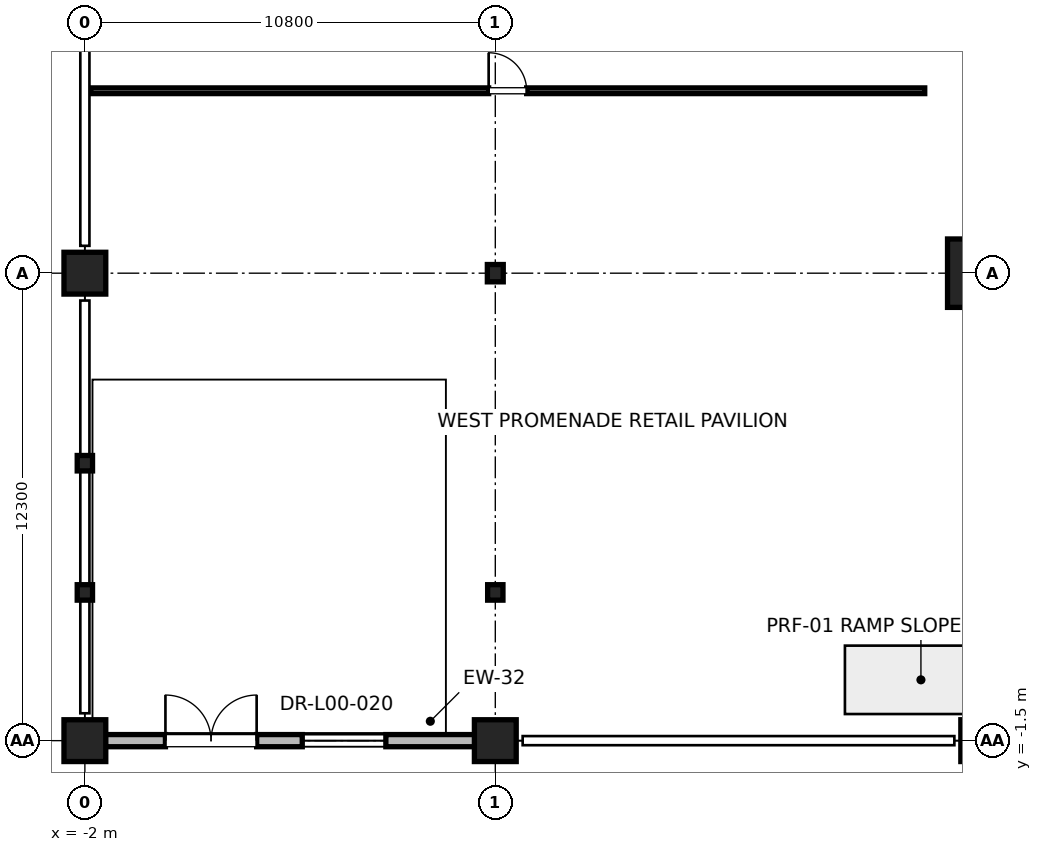
"""IFC4 building model, lengths in metres.
Left out: names, types, materials, properties, quantities, classifications, styles, units other than length and angle.
Written with IfcOpenShell. Run it as: python <this file> out.ifc"""

import sys

from ifc_helpers import new_model, si_unit, direction, frame, frame_2d, origin, origin_2d, place, context, subcontext, project, spatial, rectangle, i_section, extrude, element, fill, save


model = new_model("IFC4")
c1 = context("Model", 3, precision=1e-05, world=origin(), true_north=direction((0.0, 1.0)))
c2 = subcontext(c1, "Body", "Model", "MODEL_VIEW")
j1 = project(units=[si_unit("LENGTHUNIT", "METRE"), si_unit("PLANEANGLEUNIT", "RADIAN")], contexts=[c1])
p1 = place(None, origin())
s1 = spatial("IfcSite", under=j1, at=p1, CompositionType="ELEMENT")
p2 = place(p1, origin())
s2 = spatial("IfcBuilding", under=s1, at=p2, CompositionType="ELEMENT")
p3 = place(p2, origin())
s3 = spatial("IfcBuildingStorey", under=s2, at=p3, CompositionType="ELEMENT", Elevation=0.0)
p4 = place(p3, frame((21.6, 10.8, 0.0), z_axis=(0.0, 0.0, 1.0), x_axis=(1.0, 0.0, 0.0)))
e1 = element("IfcColumn", 1, at=p4, inside=s3, PredefinedType="COLUMN", context=c2, shape_type="SweptSolid", body=[
    extrude(rectangle(XDim=1.8, YDim=1.8, at=origin_2d()), origin(), (0.0, 0.0, 1.0), 6.0),
])
for number, where, z_axis, x_axis in (
    (2, (-2.0, -1.5, 0.0), (0.0, 0.0, 1.0), (1.0, 0.0, 0.0)),
    (3, (-2.0, 10.8, 0.0), (0.0, 0.0, 1.0), (1.0, 0.0, 0.0)),
    (4, (8.8, -1.5, 0.0), (0.0, 0.0, 1.0), (1.0, 0.0, 0.0)),
    (5, (21.6, -1.5, 0.0), (0.0, 0.0, 1.0), (1.0, 0.0, 0.0)),
):
    element("IfcColumn", number, at=place(p3, frame(where, z_axis=z_axis, x_axis=x_axis)), inside=s3, PredefinedType="COLUMN", context=c2, shape_type="SweptSolid", body=[
        extrude(rectangle(XDim=1.1, YDim=1.1, at=origin_2d()), origin(), (0.0, 0.0, 1.0), 6.0),
    ])
p5 = place(p3, frame((8.8, 10.8, 0.0), z_axis=(0.0, 0.0, 1.0), x_axis=(1.0, 0.0, 0.0)))
e6 = element("IfcColumn", 6, at=p5, inside=s3, PredefinedType="COLUMN", context=c2, shape_type="SweptSolid", body=[
    extrude(i_section(OverallWidth=0.418, OverallDepth=0.456, WebThickness=0.042, FlangeThickness=0.067, FilletRadius=0.015, at=origin_2d()), origin(), (0.0, 0.0, 1.0), 6.0),
])
for number, where, z_axis, x_axis in (
    (7, (-2.0, 2.4, 0.0), (0.0, 0.0, 1.0), (1.0, 0.0, 0.0)),
    (8, (8.8, 2.4, 0.0), (0.0, 0.0, 1.0), (1.0, 0.0, 0.0)),
    (9, (-2.0, 5.8, 0.0), (0.0, 0.0, 1.0), (1.0, 0.0, 0.0)),
):
    element("IfcColumn", number, at=place(p3, frame(where, z_axis=z_axis, x_axis=x_axis)), inside=s3, PredefinedType="COLUMN", context=c2, shape_type="SweptSolid", body=[
        extrude(i_section(OverallWidth=0.403, OverallDepth=0.406, WebThickness=0.027, FlangeThickness=0.043, FilletRadius=0.015, at=origin_2d()), origin(), (0.0, 0.0, 1.0), 6.0),
    ])
p6 = place(p3, frame((-1.46, -1.5, 0.0), z_axis=(0.0, 0.0, 1.0), x_axis=(1.0, 0.0, 0.0)))
e10 = element("IfcWall", 10, at=p6, inside=s3, PredefinedType="SOLIDWALL", context=c2, shape_type="SweptSolid", body=[
    extrude(rectangle(XDim=9.72, YDim=0.32, at=frame_2d((4.86, 0.0))), origin(), (0.0, 0.0, 1.0), 4.759),
])
p7 = place(p6, frame((1.58, 0.0, 0.0)))
e11 = element("IfcOpeningElement", 11, at=p7, cuts=e10, PredefinedType="OPENING", context=c2, shape_type="SweptSolid", body=[
    extrude(rectangle(XDim=2.4, YDim=2.8, at=frame_2d((1.2, 1.4))), frame((0.0, 0.16, 0.0), z_axis=(0.0, -1.0, 0.0), x_axis=(1.0, 0.0, 0.0)), (0.0, 0.0, 1.0), 0.32),
])
p8 = place(p6, frame((5.18, 0.0, 0.85)))
e12 = element("IfcOpeningElement", 12, at=p8, cuts=e10, PredefinedType="OPENING", context=c2, shape_type="SweptSolid", body=[
    extrude(rectangle(XDim=2.2, YDim=2.35, at=frame_2d((1.1, 1.175))), frame((0.0, 0.16, 0.0), z_axis=(0.0, -1.0, 0.0), x_axis=(1.0, 0.0, 0.0)), (0.0, 0.0, 1.0), 0.32),
])
p9 = place(p3, frame((-1.85, 15.6, 0.0), z_axis=(0.0, 0.0, 1.0), x_axis=(1.0, 0.0, 0.0)))
e13 = element("IfcWall", 13, at=p9, inside=s3, PredefinedType="PARTITIONING", context=c2, shape_type="SweptSolid", body=[
    extrude(rectangle(XDim=21.95, YDim=0.15, at=frame_2d((10.975, 0.0))), origin(), (0.0, 0.0, 1.0), 2.85),
])
p10 = place(p9, frame((10.475, 0.0, 0.0)))
e14 = element("IfcOpeningElement", 14, at=p10, cuts=e13, PredefinedType="OPENING", context=c2, shape_type="SweptSolid", body=[
    extrude(rectangle(XDim=1.0, YDim=2.15, at=frame_2d((0.5, 1.075))), frame((0.0, 0.075, 0.0), z_axis=(0.0, -1.0, 0.0), x_axis=(1.0, 0.0, 0.0)), (0.0, 0.0, 1.0), 0.15),
])
p11 = place(p7, origin())
e15 = element("IfcDoor", 15, at=p11, inside=s3, OperationType="DOUBLE_DOOR_SINGLE_SWING", PredefinedType="DOOR", context=c2, shape_type="SweptSolid", body=[
    extrude(rectangle(XDim=2.4, YDim=2.8, at=frame_2d((1.2, 1.4))), frame((0.0, 0.025, 0.0), z_axis=(0.0, -1.0, 0.0), x_axis=(1.0, 0.0, 0.0)), (0.0, 0.0, 1.0), 0.05),
])
fill(e11, e15)
p12 = place(p8, origin())
e16 = element("IfcWindow", 16, at=p12, inside=s3, PartitioningType="SINGLE_PANEL", PredefinedType="WINDOW", context=c2, shape_type="SweptSolid", body=[
    extrude(rectangle(XDim=2.2, YDim=2.35, at=frame_2d((1.1, 1.175))), frame((0.0, 0.03, 0.0), z_axis=(0.0, -1.0, 0.0), x_axis=(1.0, 0.0, 0.0)), (0.0, 0.0, 1.0), 0.06),
])
fill(e12, e16)
p13 = place(p10, origin())
e17 = element("IfcDoor", 17, at=p13, inside=s3, OperationType="SINGLE_SWING_LEFT", PredefinedType="DOOR", context=c2, shape_type="SweptSolid", body=[
    extrude(rectangle(XDim=1.0, YDim=2.15, at=frame_2d((0.5, 1.075))), frame((0.0, 0.025, 0.0), z_axis=(0.0, -1.0, 0.0), x_axis=(1.0, 0.0, 0.0)), (0.0, 0.0, 1.0), 0.05),
])
fill(e14, e17)
save(model, sys.argv[1])
